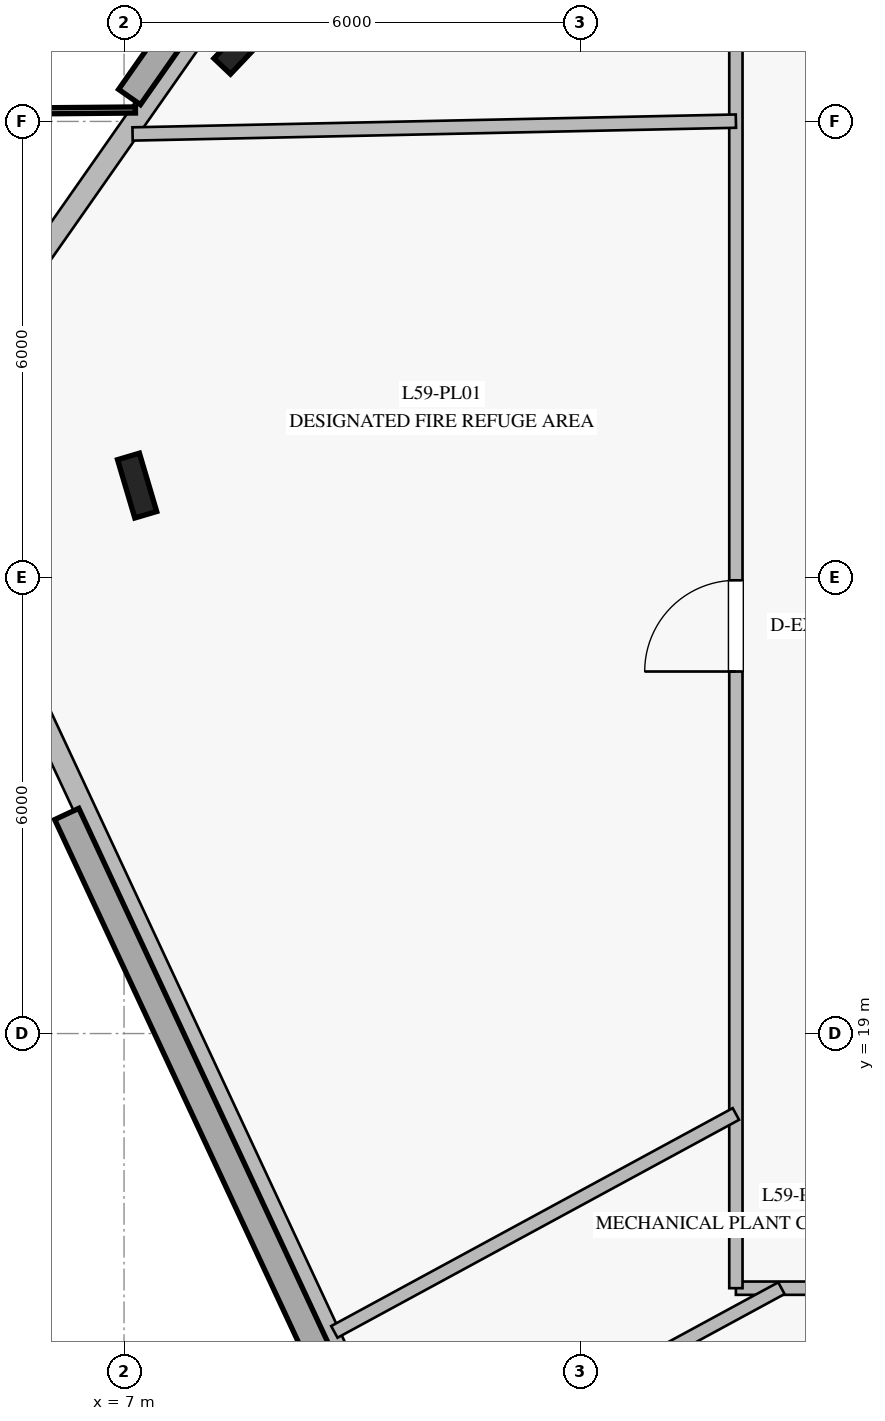
"""IFC4 building model, lengths in metres.
Left out: names, types, materials, properties, quantities, classifications, styles, units other than length and angle.
Written with IfcOpenShell. Run it as: python <this file> out.ifc"""

import sys

from ifc_helpers import new_model, si_unit, direction, frame, frame_2d, origin, origin_2d, place, context, subcontext, project, spatial, rectangle, i_section, extrude, element, fill, save


model = new_model("IFC4")
c1 = context("Model", 3, precision=1e-05, world=origin(), true_north=direction((0.0, 1.0)))
c2 = subcontext(c1, "Body", "Model", "MODEL_VIEW")
j1 = project(units=[si_unit("LENGTHUNIT", "METRE"), si_unit("PLANEANGLEUNIT", "RADIAN")], contexts=[c1])
p1 = place(None, origin())
s1 = spatial("IfcSite", under=j1, at=p1, CompositionType="ELEMENT")
p2 = place(p1, origin())
s2 = spatial("IfcBuilding", under=s1, at=p2, CompositionType="ELEMENT")
p3 = place(p2, frame((0.0, 0.0, 244.8)))
s3 = spatial("IfcBuildingStorey", under=s2, at=p3, CompositionType="ELEMENT", Elevation=244.8)
for number, where, z_axis, x_axis in (
    (1, (8.567, 32.016, 0.0), (0.0, 0.0, 1.0), (0.688, 0.725, 0.0)),
    (2, (7.172, 26.209, 0.0), (0.0, 0.0, 1.0), (-0.284, 0.959, 0.0)),
):
    element("IfcColumn", number, at=place(p3, frame(where, z_axis=z_axis, x_axis=x_axis)), inside=s3, PredefinedType="COLUMN", context=c2, shape_type="SweptSolid", body=[
        extrude(i_section(OverallWidth=0.3, OverallDepth=0.8, WebThickness=0.018, FlangeThickness=0.033, at=origin_2d()), origin(), (0.0, 0.0, 1.0), 5.4),
    ])
p4 = place(p3, frame((14.701, 41.799, 0.0), z_axis=(0.0, 0.0, 1.0), x_axis=(-0.573547879244, -0.819172039449, 0.0)))
e3 = element("IfcWall", 3, at=p4, inside=s3, PredefinedType="STANDARD", context=c2, shape_type="SweptSolid", body=[
    extrude(rectangle(XDim=15.708, YDim=0.28, at=frame_2d((7.854, 0.0))), origin(), (0.0, 0.0, 1.0), 5.18),
])
p5 = place(p3, frame((5.302, 24.481, 0.0), z_axis=(0.0, 0.0, 1.0), x_axis=(0.422651460509, -0.906292305456, 0.0)))
e4 = element("IfcWall", 4, at=p5, inside=s3, PredefinedType="STANDARD", context=c2, shape_type="SweptSolid", body=[
    extrude(rectangle(XDim=15.708, YDim=0.28, at=frame_2d((7.854, 0.0))), origin(), (0.0, 0.0, 1.0), 5.18),
])
p6 = place(p3, frame((34.95, 15.65, 0.0), z_axis=(0.0, 0.0, 1.0), x_axis=(-1.0, 0.0, 0.0)))
e5 = element("IfcWall", 5, at=p6, inside=s3, PredefinedType="PARTITIONING", context=c2, shape_type="SweptSolid", body=[
    extrude(rectangle(XDim=19.9, YDim=0.175, at=frame_2d((9.95, 0.0))), origin(), (0.0, 0.0, 1.0), 3.78),
])
p7 = place(p6, frame((14.073, 0.0, 0.0)))
e6 = element("IfcOpeningElement", 6, at=p7, cuts=e5, PredefinedType="OPENING", context=c2, shape_type="SweptSolid", body=[
    extrude(rectangle(XDim=1.15, YDim=2.2, at=frame_2d((0.575, 1.1))), frame((0.0, 0.098, 0.0), z_axis=(0.0, -1.0, 0.0), x_axis=(1.0, 0.0, 0.0)), (0.0, 0.0, 1.0), 0.195),
])
p8 = place(p6, frame((4.477, 0.0, 0.0)))
e7 = element("IfcOpeningElement", 7, at=p8, cuts=e5, PredefinedType="OPENING", context=c2, shape_type="SweptSolid", body=[
    extrude(rectangle(XDim=1.15, YDim=2.2, at=frame_2d((0.575, 1.1))), frame((0.0, 0.098, 0.0), z_axis=(0.0, -1.0, 0.0), x_axis=(1.0, 0.0, 0.0)), (0.0, 0.0, 1.0), 0.195),
])
p9 = place(p3, frame((15.05, 15.65, 0.0), z_axis=(0.0, 0.0, 1.0), x_axis=(0.0, 1.0, 0.0)))
e8 = element("IfcWall", 8, at=p9, inside=s3, PredefinedType="PARTITIONING", context=c2, shape_type="SweptSolid", body=[
    extrude(rectangle(XDim=18.7, YDim=0.175, at=frame_2d((9.35, 0.0))), origin(), (0.0, 0.0, 1.0), 3.78),
])
p10 = place(p9, frame((8.113, 0.0, 0.0)))
e9 = element("IfcOpeningElement", 9, at=p10, cuts=e8, PredefinedType="OPENING", context=c2, shape_type="SweptSolid", body=[
    extrude(rectangle(XDim=1.2, YDim=2.25, at=frame_2d((0.6, 1.125))), frame((0.0, 0.098, 0.0), z_axis=(0.0, -1.0, 0.0), x_axis=(1.0, 0.0, 0.0)), (0.0, 0.0, 1.0), 0.195),
])
p11 = place(p3, frame((15.05, 17.942, 0.0), z_axis=(0.0, 0.0, 1.0), x_axis=(-0.878919599329, -0.476969954939, 0.0)))
e10 = element("IfcWall", 10, at=p11, inside=s3, PredefinedType="PARTITIONING", context=c2, shape_type="SweptSolid", body=[
    extrude(rectangle(XDim=6.011, YDim=0.175, at=frame_2d((3.005, 0.0))), origin(), (0.0, 0.0, 1.0), 3.78),
])
p12 = place(p3, frame((15.649, 15.65, 0.0), z_axis=(0.0, 0.0, 1.0), x_axis=(-0.878891138972, -0.477022395529, 0.0)))
e11 = element("IfcWall", 11, at=p12, inside=s3, PredefinedType="PARTITIONING", context=c2, shape_type="SweptSolid", body=[
    extrude(rectangle(XDim=5.584, YDim=0.175, at=frame_2d((2.792, 0.0))), origin(), (0.0, 0.0, 1.0), 3.78),
])
p13 = place(p3, frame((15.05, 31.004, 0.0), z_axis=(0.0, 0.0, 1.0), x_axis=(-0.9997735909, -0.021278320874, 0.0)))
e12 = element("IfcWall", 12, at=p13, inside=s3, PredefinedType="PARTITIONING", context=c2, shape_type="SweptSolid", body=[
    extrude(rectangle(XDim=7.94, YDim=0.175, at=frame_2d((3.97, 0.0))), origin(), (0.0, 0.0, 1.0), 3.78),
])
p14 = place(p10, origin())
e13 = element("IfcDoor", 13, at=p14, inside=s3, OperationType="SINGLE_SWING_LEFT", PredefinedType="DOOR", context=c2, shape_type="SweptSolid", body=[
    extrude(rectangle(XDim=1.2, YDim=2.25, at=frame_2d((0.6, 1.125))), frame((0.0, 0.025, 0.0), z_axis=(0.0, -1.0, 0.0), x_axis=(1.0, 0.0, 0.0)), (0.0, 0.0, 1.0), 0.05),
])
fill(e9, e13)
save(model, sys.argv[1])
